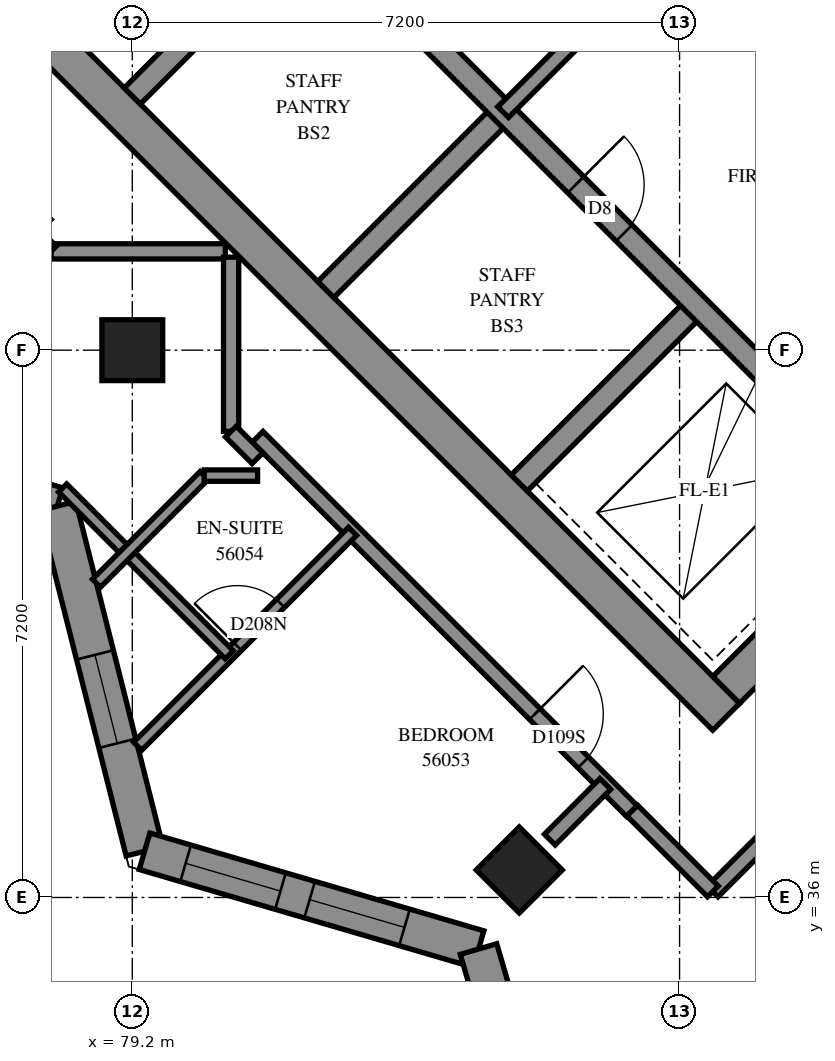
"""IFC4 building model, lengths in metres.
Left out: names, types, materials, properties, quantities, classifications, styles, units other than length and angle.
Written with IfcOpenShell. Run it as: python <this file> out.ifc"""

import sys

from ifc_helpers import new_model, si_unit, direction, frame, frame_2d, origin, origin_2d, place, context, subcontext, project, spatial, polyline, rectangle, outline, extrude, element, fill, save


model = new_model("IFC4")
c1 = context("Model", 3, precision=1e-05, world=origin(), true_north=direction((0.0, 1.0)))
c2 = subcontext(c1, "Body", "Model", "MODEL_VIEW")
j1 = project(units=[si_unit("LENGTHUNIT", "METRE"), si_unit("PLANEANGLEUNIT", "RADIAN")], contexts=[c1])
p1 = place(None, origin())
s1 = spatial("IfcSite", under=j1, at=p1, CompositionType="ELEMENT")
p2 = place(p1, origin())
s2 = spatial("IfcBuilding", under=s1, at=p2, CompositionType="ELEMENT")
p3 = place(p2, frame((0.0, 0.0, 206.6)))
s3 = spatial("IfcBuildingStorey", under=s2, at=p3, CompositionType="ELEMENT", Elevation=206.6)
for number, where, z_axis, x_axis in (
    (1, (79.2, 43.2, 0.0), (0.0, 0.0, 1.0), (1.0, 0.0, 0.0)),
    (2, (84.291, 36.362, 0.0), (0.0, 0.0, 1.0), (0.707, -0.707, 0.0)),
):
    element("IfcColumn", number, at=place(p3, frame(where, z_axis=z_axis, x_axis=x_axis)), inside=s3, PredefinedType="COLUMN", context=c2, shape_type="SweptSolid", body=[
        extrude(rectangle(XDim=0.8, YDim=0.8, at=origin_2d()), origin(), (0.0, 0.0, 1.0), 3.1),
    ])
p4 = place(p3, frame((76.124, 49.267, -0.3), z_axis=(0.0, 0.0, 1.0), x_axis=(0.7071067812, -0.7071067812, 0.0)))
e3 = element("IfcWall", 3, at=p4, inside=s3, PredefinedType="SHEAR", context=c2, shape_type="SweptSolid", body=[
    extrude(rectangle(XDim=15.4, YDim=0.5, at=frame_2d((7.7, 0.0))), origin(), (0.0, 0.0, 1.0), 2.7),
])
p5 = place(p3, frame((87.013, 38.731, -0.3), z_axis=(0.0, 0.0, 1.0), x_axis=(0.7071067812, 0.7071067812, 0.0)))
e4 = element("IfcWall", 4, at=p5, inside=s3, PredefinedType="SHEAR", context=c2, shape_type="SweptSolid", body=[
    extrude(rectangle(XDim=14.4, YDim=0.5, at=frame_2d((7.2, 0.0))), origin(), (0.0, 0.0, 1.0), 2.7),
])
p6 = place(p5, frame((4.55, 0.0, 0.3)))
e5 = element("IfcOpeningElement", 5, at=p6, cuts=e4, PredefinedType="OPENING", context=c2, shape_type="SweptSolid", body=[
    extrude(rectangle(XDim=1.1, YDim=2.1, at=frame_2d((0.55, 1.05))), frame((0.0, 0.26, 0.0), z_axis=(0.0, -1.0, 0.0), x_axis=(1.0, 0.0, 0.0)), (0.0, 0.0, 1.0), 0.52),
])
p7 = place(p5, frame((11.35, 0.0, 0.3)))
e6 = element("IfcOpeningElement", 6, at=p7, cuts=e4, PredefinedType="OPENING", context=c2, shape_type="SweptSolid", body=[
    extrude(rectangle(XDim=1.1, YDim=2.1, at=frame_2d((0.55, 1.05))), frame((0.0, 0.26, 0.0), z_axis=(0.0, -1.0, 0.0), x_axis=(1.0, 0.0, 0.0)), (0.0, 0.0, 1.0), 0.52),
])
p8 = place(p3, frame((79.2, 46.544, 0.0), z_axis=(0.0, 0.0, 1.0), x_axis=(0.7071219326, 0.7070916295, 0.0)))
e7 = element("IfcWall", 7, at=p8, inside=s3, PredefinedType="SOLIDWALL", context=c2, shape_type="SweptSolid", body=[
    extrude(rectangle(XDim=3.3, YDim=0.3, at=frame_2d((1.65, 0.0))), origin(), (0.0, 0.0, 1.0), 3.1),
])
for number, where, z_axis, x_axis in (
    (8, (81.746, 43.999, 0.0), (0.0, 0.0, 1.0), (0.707, 0.707, 0.0)),
    (9, (84.291, 41.453, 0.0), (0.0, 0.0, 1.0), (0.707, 0.707, 0.0)),
):
    element("IfcWall", number, at=place(p3, frame(where, z_axis=z_axis, x_axis=x_axis)), inside=s3, PredefinedType="SOLIDWALL", context=c2, shape_type="SweptSolid", body=[
        extrude(rectangle(XDim=3.3, YDim=0.3, at=frame_2d((1.65, 0.0))), origin(), (0.0, 0.0, 1.0), 3.1),
    ])
p9 = place(p3, frame((78.988, 51.423, 0.0), z_axis=(0.0, 0.0, 1.0), x_axis=(0.7071067812, -0.7071067812, 0.0)))
e10 = element("IfcWall", 10, at=p9, inside=s3, PredefinedType="SOLIDWALL", context=c2, shape_type="SweptSolid", body=[
    extrude(rectangle(XDim=14.4, YDim=0.3, at=frame_2d((7.2, 0.0))), origin(), (0.0, 0.0, 1.0), 3.1),
])
p10 = place(p9, frame((1.35, 0.0, 0.0)))
e11 = element("IfcOpeningElement", 11, at=p10, cuts=e10, PredefinedType="OPENING", context=c2, shape_type="SweptSolid", body=[
    extrude(rectangle(XDim=0.9, YDim=2.1, at=frame_2d((0.45, 1.05))), frame((0.0, 0.16, 0.0), z_axis=(0.0, -1.0, 0.0), x_axis=(1.0, 0.0, 0.0)), (0.0, 0.0, 1.0), 0.32),
])
p11 = place(p9, frame((4.95, 0.0, 0.0)))
e12 = element("IfcOpeningElement", 12, at=p11, cuts=e10, PredefinedType="OPENING", context=c2, shape_type="SweptSolid", body=[
    extrude(rectangle(XDim=0.9, YDim=2.1, at=frame_2d((0.45, 1.05))), frame((0.0, 0.16, 0.0), z_axis=(0.0, -1.0, 0.0), x_axis=(1.0, 0.0, 0.0)), (0.0, 0.0, 1.0), 0.32),
])
p12 = place(p9, frame((8.55, 0.0, 0.0)))
e13 = element("IfcOpeningElement", 13, at=p12, cuts=e10, PredefinedType="OPENING", context=c2, shape_type="SweptSolid", body=[
    extrude(rectangle(XDim=0.9, YDim=2.1, at=frame_2d((0.45, 1.05))), frame((0.0, 0.16, 0.0), z_axis=(0.0, -1.0, 0.0), x_axis=(1.0, 0.0, 0.0)), (0.0, 0.0, 1.0), 0.32),
])
p13 = place(p9, frame((12.05, 0.0, 0.0)))
e14 = element("IfcOpeningElement", 14, at=p13, cuts=e10, PredefinedType="OPENING", context=c2, shape_type="SweptSolid", body=[
    extrude(rectangle(XDim=1.1, YDim=2.1, at=frame_2d((0.55, 1.05))), frame((0.0, 0.16, 0.0), z_axis=(0.0, -1.0, 0.0), x_axis=(1.0, 0.0, 0.0)), (0.0, 0.0, 1.0), 0.32),
])
p14 = place(p3, frame((81.534, 53.969, 0.0), z_axis=(0.0, 0.0, 1.0), x_axis=(0.707103309, -0.7071102534, 0.0)))
e15 = element("IfcWall", 15, at=p14, inside=s3, PredefinedType="SOLIDWALL", context=c2, shape_type="SweptSolid", body=[
    extrude(rectangle(XDim=14.4, YDim=0.3, at=frame_2d((7.2, 0.0))), origin(), (0.0, 0.0, 1.0), 3.1),
])
p15 = place(p14, frame((1.25, 0.0, 0.0)))
e16 = element("IfcOpeningElement", 16, at=p15, cuts=e15, PredefinedType="OPENING", context=c2, shape_type="SweptSolid", body=[
    extrude(rectangle(XDim=1.1, YDim=2.1, at=frame_2d((0.55, 1.05))), frame((0.0, 0.16, 0.0), z_axis=(0.0, -1.0, 0.0), x_axis=(1.0, 0.0, 0.0)), (0.0, 0.0, 1.0), 0.32),
])
p16 = place(p14, frame((4.85, 0.0, 0.0)))
e17 = element("IfcOpeningElement", 17, at=p16, cuts=e15, PredefinedType="OPENING", context=c2, shape_type="SweptSolid", body=[
    extrude(rectangle(XDim=1.1, YDim=2.1, at=frame_2d((0.55, 1.05))), frame((0.0, 0.16, 0.0), z_axis=(0.0, -1.0, 0.0), x_axis=(1.0, 0.0, 0.0)), (0.0, 0.0, 1.0), 0.32),
])
p17 = place(p14, frame((8.45, 0.0, 0.0)))
e18 = element("IfcOpeningElement", 18, at=p17, cuts=e15, PredefinedType="OPENING", context=c2, shape_type="SweptSolid", body=[
    extrude(rectangle(XDim=1.1, YDim=2.1, at=frame_2d((0.55, 1.05))), frame((0.0, 0.16, 0.0), z_axis=(0.0, -1.0, 0.0), x_axis=(1.0, 0.0, 0.0)), (0.0, 0.0, 1.0), 0.32),
])
p18 = place(p14, frame((12.05, 0.0, 0.0)))
e19 = element("IfcOpeningElement", 19, at=p18, cuts=e15, PredefinedType="OPENING", context=c2, shape_type="SweptSolid", body=[
    extrude(rectangle(XDim=1.1, YDim=2.1, at=frame_2d((0.55, 1.05))), frame((0.0, 0.16, 0.0), z_axis=(0.0, -1.0, 0.0), x_axis=(1.0, 0.0, 0.0)), (0.0, 0.0, 1.0), 0.32),
])
p19 = place(p3, frame((74.426, 42.255, 0.0), z_axis=(0.0, 0.0, 1.0), x_axis=(0.9599457695, -0.2801858662, 0.0)))
e20 = element("IfcWall", 20, at=p19, inside=s3, PredefinedType="SOLIDWALL", context=c2, shape_type="SweptSolid", body=[
    extrude(outline(polyline([(0.052, -0.25), (3.803, -0.25), (4.089, 0.25), (-0.052, 0.25), (0.052, -0.25)])), origin(), (0.0, 0.0, 1.0), 3.1),
])
p20 = place(p19, frame((1.834, 0.0, 0.45)))
e21 = element("IfcOpeningElement", 21, at=p20, cuts=e20, PredefinedType="OPENING", context=c2, shape_type="SweptSolid", body=[
    extrude(rectangle(XDim=1.2, YDim=2.5, at=frame_2d((0.6, 1.25))), frame((0.0, 0.26, 0.0), z_axis=(0.0, -1.0, 0.0), x_axis=(1.0, 0.0, 0.0)), (0.0, 0.0, 1.0), 0.52),
])
p21 = place(p3, frame((78.214, 41.149, 0.0), z_axis=(0.0, 0.0, 1.0), x_axis=(0.2448559355, -0.9695594726, 0.0)))
e22 = element("IfcWall", 22, at=p21, inside=s3, PredefinedType="SOLIDWALL", context=c2, shape_type="SweptSolid", body=[
    extrude(outline(polyline([(0.143, -0.25), (4.827, -0.25), (4.541, 0.25), (-0.143, 0.25), (0.143, -0.25)])), origin(), (0.0, 0.0, 1.0), 3.1),
])
p22 = place(p21, frame((2.019, 0.0, 0.45)))
e23 = element("IfcOpeningElement", 23, at=p22, cuts=e22, PredefinedType="OPENING", context=c2, shape_type="SweptSolid", body=[
    extrude(rectangle(XDim=1.2, YDim=2.5, at=frame_2d((0.6, 1.25))), frame((0.0, 0.26, 0.0), z_axis=(0.0, -1.0, 0.0), x_axis=(1.0, 0.0, 0.0)), (0.0, 0.0, 1.0), 0.52),
])
p23 = place(p3, frame((79.361, 36.608, 0.0), z_axis=(0.0, 0.0, 1.0), x_axis=(0.9597039352, -0.2810130901, 0.0)))
e24 = element("IfcWall", 24, at=p23, inside=s3, PredefinedType="SOLIDWALL", context=c2, shape_type="SweptSolid", body=[
    extrude(outline(polyline([(-0.143, -0.25), (4.441, -0.25), (4.715, 0.25), (0.143, 0.25), (-0.143, -0.25)])), origin(), (0.0, 0.0, 1.0), 3.1),
])
p24 = place(p23, frame((0.563, 0.0, 0.45)))
e25 = element("IfcOpeningElement", 25, at=p24, cuts=e24, PredefinedType="OPENING", context=c2, shape_type="SweptSolid", body=[
    extrude(rectangle(XDim=1.3, YDim=2.5, at=frame_2d((0.65, 1.25))), frame((0.0, 0.26, 0.0), z_axis=(0.0, -1.0, 0.0), x_axis=(1.0, 0.0, 0.0)), (0.0, 0.0, 1.0), 0.52),
])
p25 = place(p23, frame((2.263, 0.0, 0.45)))
e26 = element("IfcOpeningElement", 26, at=p25, cuts=e24, PredefinedType="OPENING", context=c2, shape_type="SweptSolid", body=[
    extrude(rectangle(XDim=1.3, YDim=2.5, at=frame_2d((0.65, 1.25))), frame((0.0, 0.26, 0.0), z_axis=(0.0, -1.0, 0.0), x_axis=(1.0, 0.0, 0.0)), (0.0, 0.0, 1.0), 0.52),
])
p26 = place(p3, frame((83.755, 35.321, 0.0), z_axis=(0.0, 0.0, 1.0), x_axis=(0.2810130901, -0.9597039352, 0.0)))
e27 = element("IfcWall", 27, at=p26, inside=s3, PredefinedType="SOLIDWALL", context=c2, shape_type="SweptSolid", body=[
    extrude(outline(polyline([(0.137, -0.25), (4.721, -0.25), (4.435, 0.25), (-0.137, 0.25), (0.137, -0.25)])), origin(), (0.0, 0.0, 1.0), 3.1),
])
p27 = place(p26, frame((1.022, 0.0, 0.45)))
e28 = element("IfcOpeningElement", 28, at=p27, cuts=e27, PredefinedType="OPENING", context=c2, shape_type="SweptSolid", body=[
    extrude(rectangle(XDim=1.2, YDim=2.5, at=frame_2d((0.6, 1.25))), frame((0.0, 0.26, 0.0), z_axis=(0.0, -1.0, 0.0), x_axis=(1.0, 0.0, 0.0)), (0.0, 0.0, 1.0), 0.52),
])
p28 = place(p3, frame((84.079, 46.332, 0.0), z_axis=(0.0, 0.0, 1.0), x_axis=(0.7071067812, 0.7071067812, 0.0)))
e29 = element("IfcWall", 29, at=p28, inside=s3, PredefinedType="PARTITIONING", context=c2, shape_type="SweptSolid", body=[
    extrude(rectangle(XDim=3.6, YDim=0.2, at=frame_2d((1.8, 0.0))), origin(), (0.0, 0.0, 1.0), 3.1),
])
p29 = place(p3, frame((84.996, 31.971, 0.0), z_axis=(0.0, 0.0, 1.0), x_axis=(0.7072316927, 0.7069818476, 0.0)))
e30 = element("IfcWall", 30, at=p29, inside=s3, PredefinedType="PARTITIONING", context=c2, shape_type="SweptSolid", body=[
    extrude(rectangle(XDim=10.006, YDim=0.2, at=frame_2d((5.003, 0.0))), origin(), (0.0, 0.0, 1.0), 3.1),
])
p30 = place(p3, frame((86.835, 36.079, 0.0), z_axis=(0.0, 0.0, 1.0), x_axis=(0.7071067812, 0.7071067812, 0.0)))
e31 = element("IfcWall", 31, at=p30, inside=s3, PredefinedType="PARTITIONING", context=c2, shape_type="SweptSolid", body=[
    extrude(rectangle(XDim=8.2, YDim=0.2, at=frame_2d((4.1, 0.0))), origin(), (0.0, 0.0, 1.0), 3.1),
])
p31 = place(p3, frame((80.849, 42.061, 0.0), z_axis=(0.0, 0.0, 1.0), x_axis=(0.7071067812, -0.7071067812, 0.0)))
e32 = element("IfcWall", 32, at=p31, inside=s3, PredefinedType="PARTITIONING", context=c2, shape_type="SweptSolid", body=[
    extrude(rectangle(XDim=6.964, YDim=0.2, at=frame_2d((3.482, 0.0))), origin(), (0.0, 0.0, 1.0), 3.1),
])
p32 = place(p31, frame((5.159, 0.0, 0.0)))
e33 = element("IfcOpeningElement", 33, at=p32, cuts=e32, PredefinedType="OPENING", context=c2, shape_type="SweptSolid", body=[
    extrude(rectangle(XDim=0.9, YDim=2.1, at=frame_2d((0.45, 1.05))), frame((0.0, 0.11, 0.0), z_axis=(0.0, -1.0, 0.0), x_axis=(1.0, 0.0, 0.0)), (0.0, 0.0, 1.0), 0.22),
])
p33 = place(p3, frame((79.27, 37.989, 0.0), z_axis=(0.0, 0.0, 1.0), x_axis=(0.7070942763, 0.7071192858, 0.0)))
e34 = element("IfcWall", 34, at=p33, inside=s3, PredefinedType="PARTITIONING", context=c2, shape_type="SweptSolid", body=[
    extrude(rectangle(XDim=3.998, YDim=0.15, at=frame_2d((1.999, 0.0))), origin(), (0.0, 0.0, 1.0), 3.1),
])
p34 = place(p33, frame((1.858, 0.0, 0.0)))
e35 = element("IfcOpeningElement", 35, at=p34, cuts=e34, PredefinedType="OPENING", context=c2, shape_type="SweptSolid", body=[
    extrude(rectangle(XDim=0.8, YDim=2.1, at=frame_2d((0.4, 1.05))), frame((0.0, 0.085, 0.0), z_axis=(0.0, -1.0, 0.0), x_axis=(1.0, 0.0, 0.0)), (0.0, 0.0, 1.0), 0.17),
])
p35 = place(p3, frame((78.284, 41.388, 0.0), z_axis=(0.0, 0.0, 1.0), x_axis=(0.7066067914, -0.7076064177, 0.0)))
e36 = element("IfcWall", 36, at=p35, inside=s3, PredefinedType="PARTITIONING", context=c2, shape_type="SweptSolid", body=[
    extrude(rectangle(XDim=3.101, YDim=0.15, at=frame_2d((1.551, 0.0))), origin(), (0.0, 0.0, 1.0), 3.1),
])
for number, where, z_axis, x_axis in (
    (37, (78.132, 44.5, 0.0), (0.0, 0.0, 1.0), (1.0, 0.0, 0.0)),
    (38, (80.5, 42.132, 0.0), (0.0, 0.0, 1.0), (0.0, 1.0, 0.0)),
):
    element("IfcWall", number, at=place(p3, frame(where, z_axis=z_axis, x_axis=x_axis)), inside=s3, PredefinedType="PARTITIONING", context=c2, shape_type="SweptSolid", body=[
        extrude(rectangle(XDim=2.292, YDim=0.2, at=frame_2d((1.146, 0.0))), origin(), (0.0, 0.0, 1.0), 3.1),
    ])
p36 = place(p3, frame((78.728, 40.134, 0.0), z_axis=(0.0, 0.0, 1.0), x_axis=(0.7070818237, 0.7071317377, 0.0)))
e39 = element("IfcWall", 39, at=p36, inside=s3, PredefinedType="PARTITIONING", context=c2, shape_type="SweptSolid", body=[
    extrude(rectangle(XDim=2.003, YDim=0.15, at=frame_2d((1.002, 0.0))), origin(), (0.0, 0.0, 1.0), 3.1),
])
p37 = place(p3, frame((85.778, 37.142, 0.0), z_axis=(0.0, 0.0, 1.0), x_axis=(0.7064400143, -0.70777292, 0.0)))
e40 = element("IfcWall", 40, at=p37, inside=s3, PredefinedType="PARTITIONING", context=c2, shape_type="SweptSolid", body=[
    extrude(rectangle(XDim=1.5, YDim=0.2, at=frame_2d((0.75, 0.0))), origin(), (0.0, 0.0, 1.0), 3.1),
])
p38 = place(p3, frame((84.693, 36.761, 0.0), z_axis=(0.0, 0.0, 1.0), x_axis=(0.7061388061, 0.708073433, 0.0)))
e41 = element("IfcWall", 41, at=p38, inside=s3, PredefinedType="PARTITIONING", context=c2, shape_type="SweptSolid", body=[
    extrude(rectangle(XDim=1.034, YDim=0.2, at=frame_2d((0.517, 0.0))), origin(), (0.0, 0.0, 1.0), 3.1),
])
p39 = place(p3, frame((80.146, 41.55, 0.0), z_axis=(0.0, 0.0, 1.0), x_axis=(1.0, 0.0, 0.0)))
e42 = element("IfcWall", 42, at=p39, inside=s3, PredefinedType="PARTITIONING", context=c2, shape_type="SweptSolid", body=[
    extrude(rectangle(XDim=0.702, YDim=0.15, at=frame_2d((0.351, 0.0))), origin(), (0.0, 0.0, 1.0), 3.1),
])
for number, where, z_axis, x_axis in (
    (43, (77.779, 44.847, 0.0), (0.0, 0.0, 1.0), (0.707, -0.707, 0.0)),
    (44, (80.497, 42.129, 0.0), (0.0, 0.0, 1.0), (0.707, -0.707, 0.0)),
):
    element("IfcWall", number, at=place(p3, frame(where, z_axis=z_axis, x_axis=x_axis)), inside=s3, PredefinedType="PARTITIONING", context=c2, shape_type="SweptSolid", body=[
        extrude(rectangle(XDim=0.495, YDim=0.2, at=frame_2d((0.247, 0.0))), origin(), (0.0, 0.0, 1.0), 3.1),
    ])
p40 = place(p22, origin())
e45 = element("IfcWindow", 45, at=p40, inside=s3, PartitioningType="SINGLE_PANEL", PredefinedType="WINDOW", context=c2, shape_type="SweptSolid", body=[
    extrude(rectangle(XDim=1.2, YDim=2.5, at=frame_2d((0.6, 1.25))), frame((0.0, 0.18, 0.0), z_axis=(0.0, -1.0, 0.0), x_axis=(1.0, 0.0, 0.0)), (0.0, 0.0, 1.0), 0.06),
])
fill(e23, e45)
p41 = place(p24, origin())
e46 = element("IfcWindow", 46, at=p41, inside=s3, PartitioningType="SINGLE_PANEL", PredefinedType="WINDOW", context=c2, shape_type="SweptSolid", body=[
    extrude(rectangle(XDim=1.3, YDim=2.5, at=frame_2d((0.65, 1.25))), frame((0.0, 0.18, 0.0), z_axis=(0.0, -1.0, 0.0), x_axis=(1.0, 0.0, 0.0)), (0.0, 0.0, 1.0), 0.06),
])
fill(e25, e46)
p42 = place(p25, origin())
e47 = element("IfcWindow", 47, at=p42, inside=s3, PartitioningType="SINGLE_PANEL", PredefinedType="WINDOW", context=c2, shape_type="SweptSolid", body=[
    extrude(rectangle(XDim=1.3, YDim=2.5, at=frame_2d((0.65, 1.25))), frame((0.0, 0.18, 0.0), z_axis=(0.0, -1.0, 0.0), x_axis=(1.0, 0.0, 0.0)), (0.0, 0.0, 1.0), 0.06),
])
fill(e26, e47)
p43 = place(p12, origin())
e48 = element("IfcDoor", 48, at=p43, inside=s3, OperationType="SINGLE_SWING_LEFT", PredefinedType="DOOR", context=c2, shape_type="SweptSolid", body=[
    extrude(rectangle(XDim=0.9, YDim=2.1, at=frame_2d((0.45, 1.05))), frame((0.0, 0.025, 0.0), z_axis=(0.0, -1.0, 0.0), x_axis=(1.0, 0.0, 0.0)), (0.0, 0.0, 1.0), 0.05),
])
fill(e13, e48)
p44 = place(p32, origin())
e49 = element("IfcDoor", 49, at=p44, inside=s3, OperationType="SINGLE_SWING_RIGHT", PredefinedType="DOOR", context=c2, shape_type="SweptSolid", body=[
    extrude(rectangle(XDim=0.9, YDim=2.1, at=frame_2d((0.45, 1.05))), frame((0.0, 0.025, 0.0), z_axis=(0.0, -1.0, 0.0), x_axis=(1.0, 0.0, 0.0)), (0.0, 0.0, 1.0), 0.05),
])
fill(e33, e49)
p45 = place(p34, origin())
e50 = element("IfcDoor", 50, at=p45, inside=s3, OperationType="SINGLE_SWING_RIGHT", PredefinedType="DOOR", context=c2, shape_type="SweptSolid", body=[
    extrude(rectangle(XDim=0.8, YDim=2.1, at=frame_2d((0.4, 1.05))), frame((0.0, 0.025, 0.0), z_axis=(0.0, -1.0, 0.0), x_axis=(1.0, 0.0, 0.0)), (0.0, 0.0, 1.0), 0.05),
])
fill(e35, e50)
save(model, sys.argv[1])
